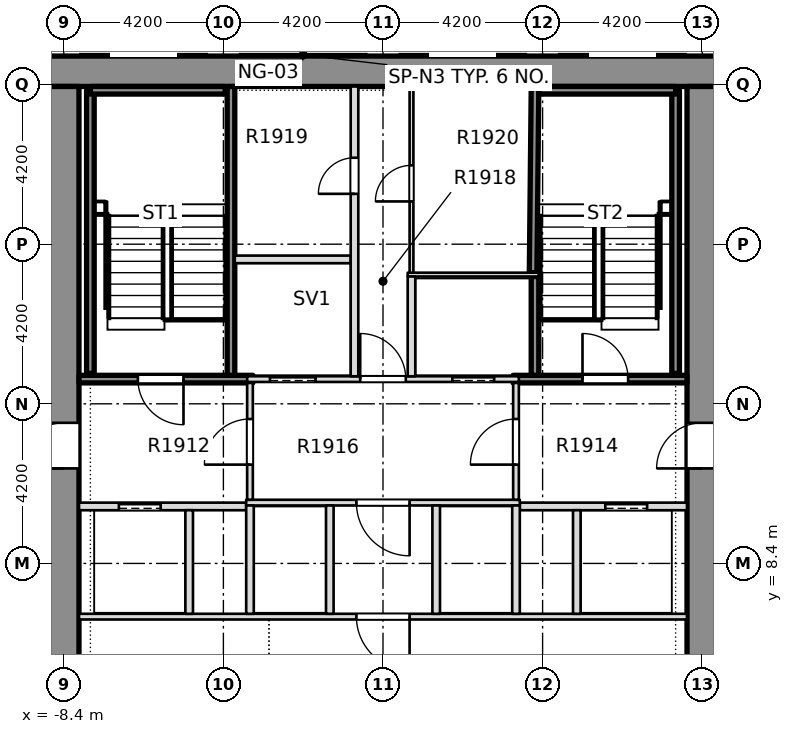
"""IFC4 building model, lengths in metres.
Left out: names, types, materials, properties, quantities, classifications, styles, units other than length and angle.
Written with IfcOpenShell. Run it as: python <this file> out.ifc"""

import sys

from ifc_helpers import new_model, si_unit, direction, frame, frame_2d, origin, place, context, subcontext, project, spatial, rectangle, extrude, element, fill, save


model = new_model("IFC4")
c1 = context("Model", 3, precision=1e-05, world=origin(), true_north=direction((0.0, 1.0)))
c2 = subcontext(c1, "Body", "Model", "MODEL_VIEW")
j1 = project(units=[si_unit("LENGTHUNIT", "METRE"), si_unit("PLANEANGLEUNIT", "RADIAN")], contexts=[c1])
p1 = place(None, origin())
s1 = spatial("IfcSite", under=j1, at=p1, CompositionType="ELEMENT")
p2 = place(p1, origin())
s2 = spatial("IfcBuilding", under=s1, at=p2, CompositionType="ELEMENT")
p3 = place(p2, frame((0.0, 0.0, 75.9)))
s3 = spatial("IfcBuildingStorey", under=s2, at=p3, CompositionType="ELEMENT", Elevation=75.9)
p4 = place(p3, frame((-11.7, 21.3, -0.5), z_axis=(0.0, 0.0, 1.0), x_axis=(1.0, 0.0, 0.0)))
e1 = element("IfcWall", 1, at=p4, inside=s3, PredefinedType="SOLIDWALL", context=c2, shape_type="SweptSolid", body=[
    extrude(rectangle(XDim=23.4, YDim=0.9, at=frame_2d((11.7, 0.0))), origin(), (0.0, 0.0, 1.0), 4.68),
])
p5 = place(p3, frame((-8.4, -7.5, -0.5), z_axis=(0.0, 0.0, 1.0), x_axis=(0.0, 1.0, 0.0)))
e2 = element("IfcWall", 2, at=p5, inside=s3, PredefinedType="SHEAR", context=c2, shape_type="SweptSolid", body=[
    extrude(rectangle(XDim=28.35, YDim=0.9, at=frame_2d((14.175, 0.0))), origin(), (0.0, 0.0, 1.0), 4.68),
])
p6 = place(p5, frame((18.4, 0.0, 0.5)))
e3 = element("IfcOpeningElement", 3, at=p6, cuts=e2, PredefinedType="OPENING", context=c2, shape_type="SweptSolid", body=[
    extrude(rectangle(XDim=1.2, YDim=2.1, at=frame_2d((0.6, 1.05))), frame((0.0, 0.46, 0.0), z_axis=(0.0, -1.0, 0.0), x_axis=(1.0, 0.0, 0.0)), (0.0, 0.0, 1.0), 0.92),
])
p7 = place(p3, frame((8.4, -7.5, -0.5), z_axis=(0.0, 0.0, 1.0), x_axis=(0.0, 1.0, 0.0)))
e4 = element("IfcWall", 4, at=p7, inside=s3, PredefinedType="SHEAR", context=c2, shape_type="SweptSolid", body=[
    extrude(rectangle(XDim=28.35, YDim=0.9, at=frame_2d((14.175, 0.0))), origin(), (0.0, 0.0, 1.0), 4.68),
])
p8 = place(p7, frame((18.4, 0.0, 0.5)))
e5 = element("IfcOpeningElement", 5, at=p8, cuts=e4, PredefinedType="OPENING", context=c2, shape_type="SweptSolid", body=[
    extrude(rectangle(XDim=1.2, YDim=2.1, at=frame_2d((0.6, 1.05))), frame((0.0, 0.46, 0.0), z_axis=(0.0, -1.0, 0.0), x_axis=(1.0, 0.0, 0.0)), (0.0, 0.0, 1.0), 0.92),
])
p9 = place(p3, frame((-7.949, 7.0, 0.0), z_axis=(0.0, 0.0, 1.0), x_axis=(1.0, 0.0, 0.0)))
e6 = element("IfcWall", 6, at=p9, inside=s3, PredefinedType="PARTITIONING", context=c2, shape_type="SweptSolid", body=[
    extrude(rectangle(XDim=15.898, YDim=0.15, at=frame_2d((7.949, 0.0))), origin(), (0.0, 0.0, 1.0), 4.18),
])
p10 = place(p9, frame((7.249, 0.0, 0.0)))
e7 = element("IfcOpeningElement", 7, at=p10, cuts=e6, PredefinedType="OPENING", context=c2, shape_type="SweptSolid", body=[
    extrude(rectangle(XDim=1.4, YDim=2.1, at=frame_2d((0.7, 1.05))), frame((0.0, 0.085, 0.0), z_axis=(0.0, -1.0, 0.0), x_axis=(1.0, 0.0, 0.0)), (0.0, 0.0, 1.0), 0.17),
])
p11 = place(p3, frame((-7.949, 9.9, 0.0), z_axis=(0.0, 0.0, 1.0), x_axis=(1.0, 0.0, 0.0)))
e8 = element("IfcWall", 8, at=p11, inside=s3, PredefinedType="PARTITIONING", context=c2, shape_type="SweptSolid", body=[
    extrude(rectangle(XDim=4.349, YDim=0.2, at=frame_2d((2.174, 0.0))), origin(), (0.0, 0.0, 1.0), 4.18),
])
p12 = place(p11, frame((0.999, 0.0, 0.0)))
e9 = element("IfcOpeningElement", 9, at=p12, cuts=e8, PredefinedType="OPENING", context=c2, shape_type="SweptSolid", body=[
    extrude(rectangle(XDim=1.1, YDim=2.1, at=frame_2d((0.55, 1.05))), frame((0.0, 0.11, 0.0), z_axis=(0.0, -1.0, 0.0), x_axis=(1.0, 0.0, 0.0)), (0.0, 0.0, 1.0), 0.22),
])
p13 = place(p3, frame((3.6, 9.9, 0.0), z_axis=(0.0, 0.0, 1.0), x_axis=(1.0, 0.0, 0.0)))
e10 = element("IfcWall", 10, at=p13, inside=s3, PredefinedType="PARTITIONING", context=c2, shape_type="SweptSolid", body=[
    extrude(rectangle(XDim=4.349, YDim=0.2, at=frame_2d((2.174, 0.0))), origin(), (0.0, 0.0, 1.0), 4.18),
])
p14 = place(p13, frame((2.25, 0.0, 0.0)))
e11 = element("IfcOpeningElement", 11, at=p14, cuts=e10, PredefinedType="OPENING", context=c2, shape_type="SweptSolid", body=[
    extrude(rectangle(XDim=1.1, YDim=2.1, at=frame_2d((0.55, 1.05))), frame((0.0, 0.11, 0.0), z_axis=(0.0, -1.0, 0.0), x_axis=(1.0, 0.0, 0.0)), (0.0, 0.0, 1.0), 0.22),
])
p15 = place(p3, frame((-3.6, 10.0, 0.0), z_axis=(0.0, 0.0, 1.0), x_axis=(1.0, 0.0, 0.0)))
e12 = element("IfcWall", 12, at=p15, inside=s3, PredefinedType="PARTITIONING", context=c2, shape_type="SweptSolid", body=[
    extrude(rectangle(XDim=7.2, YDim=0.15, at=frame_2d((3.6, 0.0))), origin(), (0.0, 0.0, 1.0), 4.18),
])
p16 = place(p15, frame((2.9, 0.0, 0.0)))
e13 = element("IfcOpeningElement", 13, at=p16, cuts=e12, PredefinedType="OPENING", context=c2, shape_type="SweptSolid", body=[
    extrude(rectangle(XDim=1.4, YDim=2.1, at=frame_2d((0.7, 1.05))), frame((0.0, 0.085, 0.0), z_axis=(0.0, -1.0, 0.0), x_axis=(1.0, 0.0, 0.0)), (0.0, 0.0, 1.0), 0.17),
])
p17 = place(p3, frame((-7.949, 13.25, 0.0), z_axis=(0.0, 0.0, 1.0), x_axis=(1.0, 0.0, 0.0)))
e14 = element("IfcWall", 14, at=p17, inside=s3, PredefinedType="SOLIDWALL", context=c2, shape_type="SweptSolid", body=[
    extrude(rectangle(XDim=4.524, YDim=0.2, at=frame_2d((2.262, 0.0))), origin(), (0.0, 0.0, 1.0), 4.18),
])
p18 = place(p17, frame((1.499, 0.0, 0.0)))
e15 = element("IfcOpeningElement", 15, at=p18, cuts=e14, PredefinedType="OPENING", context=c2, shape_type="SweptSolid", body=[
    extrude(rectangle(XDim=1.2, YDim=2.1, at=frame_2d((0.6, 1.05))), frame((0.0, 0.11, 0.0), z_axis=(0.0, -1.0, 0.0), x_axis=(1.0, 0.0, 0.0)), (0.0, 0.0, 1.0), 0.22),
])
p19 = place(p3, frame((-3.575, 13.25, 0.0), z_axis=(0.0, 0.0, 1.0), x_axis=(1.0, 0.0, 0.0)))
e16 = element("IfcWall", 16, at=p19, inside=s3, PredefinedType="PARTITIONING", context=c2, shape_type="SweptSolid", body=[
    extrude(rectangle(XDim=7.15, YDim=0.15, at=frame_2d((3.575, 0.0))), origin(), (0.0, 0.0, 1.0), 4.18),
])
p20 = place(p19, frame((0.6, 0.0, 0.0)))
e17 = element("IfcOpeningElement", 17, at=p20, cuts=e16, PredefinedType="OPENING", context=c2, shape_type="SweptSolid", body=[
    extrude(rectangle(XDim=1.2, YDim=2.1, at=frame_2d((0.6, 1.05))), frame((0.0, 0.085, 0.0), z_axis=(0.0, -1.0, 0.0), x_axis=(1.0, 0.0, 0.0)), (0.0, 0.0, 1.0), 0.17),
])
p21 = place(p19, frame((5.4, 0.0, 0.0)))
e18 = element("IfcOpeningElement", 18, at=p21, cuts=e16, PredefinedType="OPENING", context=c2, shape_type="SweptSolid", body=[
    extrude(rectangle(XDim=1.1, YDim=2.1, at=frame_2d((0.55, 1.05))), frame((0.0, 0.085, 0.0), z_axis=(0.0, -1.0, 0.0), x_axis=(1.0, 0.0, 0.0)), (0.0, 0.0, 1.0), 0.17),
])
p22 = place(p19, frame((2.975, 0.0, 0.0)))
e19 = element("IfcOpeningElement", 19, at=p22, cuts=e16, PredefinedType="OPENING", context=c2, shape_type="SweptSolid", body=[
    extrude(rectangle(XDim=1.2, YDim=2.1, at=frame_2d((0.6, 1.05))), frame((0.0, 0.085, 0.0), z_axis=(0.0, -1.0, 0.0), x_axis=(1.0, 0.0, 0.0)), (0.0, 0.0, 1.0), 0.17),
])
p23 = place(p3, frame((3.425, 13.25, 0.0), z_axis=(0.0, 0.0, 1.0), x_axis=(1.0, 0.0, 0.0)))
e20 = element("IfcWall", 20, at=p23, inside=s3, PredefinedType="SOLIDWALL", context=c2, shape_type="SweptSolid", body=[
    extrude(rectangle(XDim=4.524, YDim=0.2, at=frame_2d((2.262, 0.0))), origin(), (0.0, 0.0, 1.0), 4.18),
])
p24 = place(p23, frame((1.825, 0.0, 0.0)))
e21 = element("IfcOpeningElement", 21, at=p24, cuts=e20, PredefinedType="OPENING", context=c2, shape_type="SweptSolid", body=[
    extrude(rectangle(XDim=1.2, YDim=2.1, at=frame_2d((0.6, 1.05))), frame((0.0, 0.11, 0.0), z_axis=(0.0, -1.0, 0.0), x_axis=(1.0, 0.0, 0.0)), (0.0, 0.0, 1.0), 0.22),
])
p25 = place(p3, frame((0.65, 16.0, 0.0), z_axis=(0.0, 0.0, 1.0), x_axis=(1.0, 0.0, 0.0)))
e22 = element("IfcWall", 22, at=p25, inside=s3, PredefinedType="PARTITIONING", context=c2, shape_type="SweptSolid", body=[
    extrude(rectangle(XDim=3.45, YDim=0.1, at=frame_2d((1.725, 0.0))), origin(), (0.0, 0.0, 1.0), 4.18),
])
p26 = place(p3, frame((-3.9, 16.4, 0.0), z_axis=(0.0, 0.0, 1.0), x_axis=(1.0, 0.0, 0.0)))
e23 = element("IfcWall", 23, at=p26, inside=s3, PredefinedType="PARTITIONING", context=c2, shape_type="SweptSolid", body=[
    extrude(rectangle(XDim=3.05, YDim=0.2, at=frame_2d((1.525, 0.0))), origin(), (0.0, 0.0, 1.0), 4.18),
])
p27 = place(p3, frame((-5.1, 7.075, 0.0), z_axis=(0.0, 0.0, 1.0), x_axis=(0.0, 1.0, 0.0)))
e24 = element("IfcWall", 24, at=p27, inside=s3, PredefinedType="PARTITIONING", context=c2, shape_type="SweptSolid", body=[
    extrude(rectangle(XDim=2.725, YDim=0.2, at=frame_2d((1.363, 0.0))), origin(), (0.0, 0.0, 1.0), 4.18),
])
p28 = place(p3, frame((-4.0, 13.35, 0.0), z_axis=(0.0, 0.0, 1.0), x_axis=(0.0, 1.0, 0.0)))
e25 = element("IfcWall", 25, at=p28, inside=s3, PredefinedType="SOLIDWALL", context=c2, shape_type="SweptSolid", body=[
    extrude(rectangle(XDim=7.499, YDim=0.2, at=frame_2d((3.75, 0.0))), origin(), (0.0, 0.0, 1.0), 4.18),
])
p29 = place(p3, frame((-3.5, 7.075, 0.0), z_axis=(0.0, 0.0, 1.0), x_axis=(0.0, 1.0, 0.0)))
e26 = element("IfcWall", 26, at=p29, inside=s3, PredefinedType="PARTITIONING", context=c2, shape_type="SweptSolid", body=[
    extrude(rectangle(XDim=2.85, YDim=0.2, at=frame_2d((1.425, 0.0))), origin(), (0.0, 0.0, 1.0), 4.18),
])
p30 = place(p3, frame((-3.5, 10.075, 0.0), z_axis=(0.0, 0.0, 1.0), x_axis=(0.0, 1.0, 0.0)))
e27 = element("IfcWall", 27, at=p30, inside=s3, PredefinedType="PARTITIONING", context=c2, shape_type="SweptSolid", body=[
    extrude(rectangle(XDim=3.075, YDim=0.15, at=frame_2d((1.538, 0.0))), origin(), (0.0, 0.0, 1.0), 4.18),
])
p31 = place(p30, frame((0.925, 0.0, 0.0)))
e28 = element("IfcOpeningElement", 28, at=p31, cuts=e27, PredefinedType="OPENING", context=c2, shape_type="SweptSolid", body=[
    extrude(rectangle(XDim=1.2, YDim=2.1, at=frame_2d((0.6, 1.05))), frame((0.0, 0.085, 0.0), z_axis=(0.0, -1.0, 0.0), x_axis=(1.0, 0.0, 0.0)), (0.0, 0.0, 1.0), 0.17),
])
p32 = place(p3, frame((-1.4, 7.075, 0.0), z_axis=(0.0, 0.0, 1.0), x_axis=(0.0, 1.0, 0.0)))
e29 = element("IfcWall", 29, at=p32, inside=s3, PredefinedType="PARTITIONING", context=c2, shape_type="SweptSolid", body=[
    extrude(rectangle(XDim=2.85, YDim=0.2, at=frame_2d((1.425, 0.0))), origin(), (0.0, 0.0, 1.0), 4.18),
])
p33 = place(p3, frame((-0.75, 13.325, 0.0), z_axis=(0.0, 0.0, 1.0), x_axis=(0.0, 1.0, 0.0)))
e30 = element("IfcWall", 30, at=p33, inside=s3, PredefinedType="PARTITIONING", context=c2, shape_type="SweptSolid", body=[
    extrude(rectangle(XDim=7.524, YDim=0.2, at=frame_2d((3.762, 0.0))), origin(), (0.0, 0.0, 1.0), 4.18),
])
p34 = place(p33, frame((4.8, 0.0, 0.0)))
e31 = element("IfcOpeningElement", 31, at=p34, cuts=e30, PredefinedType="OPENING", context=c2, shape_type="SweptSolid", body=[
    extrude(rectangle(XDim=0.95, YDim=2.1, at=frame_2d((0.475, 1.05))), frame((0.0, 0.11, 0.0), z_axis=(0.0, -1.0, 0.0), x_axis=(1.0, 0.0, 0.0)), (0.0, 0.0, 1.0), 0.22),
])
p35 = place(p3, frame((0.75, 13.325, 0.0), z_axis=(0.0, 0.0, 1.0), x_axis=(0.0, 1.0, 0.0)))
e32 = element("IfcWall", 32, at=p35, inside=s3, PredefinedType="PARTITIONING", context=c2, shape_type="SweptSolid", body=[
    extrude(rectangle(XDim=2.625, YDim=0.2, at=frame_2d((1.312, 0.0))), origin(), (0.0, 0.0, 1.0), 4.18),
])
p36 = place(p3, frame((0.75, 16.05, 0.0), z_axis=(0.0, 0.0, 1.0), x_axis=(0.0, 1.0, 0.0)))
e33 = element("IfcWall", 33, at=p36, inside=s3, PredefinedType="PARTITIONING", context=c2, shape_type="SweptSolid", body=[
    extrude(rectangle(XDim=4.799, YDim=0.1, at=frame_2d((2.399, 0.0))), origin(), (0.0, 0.0, 1.0), 4.18),
])
p37 = place(p36, frame((1.875, 0.0, 0.0)))
e34 = element("IfcOpeningElement", 34, at=p37, cuts=e33, PredefinedType="OPENING", context=c2, shape_type="SweptSolid", body=[
    extrude(rectangle(XDim=0.95, YDim=2.1, at=frame_2d((0.475, 1.05))), frame((0.0, 0.06, 0.0), z_axis=(0.0, -1.0, 0.0), x_axis=(1.0, 0.0, 0.0)), (0.0, 0.0, 1.0), 0.12),
])
for number, where, z_axis, x_axis in (
    (35, (1.4, 7.075, 0.0), (0.0, 0.0, 1.0), (0.0, 1.0, 0.0)),
    (36, (3.5, 7.075, 0.0), (0.0, 0.0, 1.0), (0.0, 1.0, 0.0)),
):
    element("IfcWall", number, at=place(p3, frame(where, z_axis=z_axis, x_axis=x_axis)), inside=s3, PredefinedType="PARTITIONING", context=c2, shape_type="SweptSolid", body=[
        extrude(rectangle(XDim=2.85, YDim=0.2, at=frame_2d((1.425, 0.0))), origin(), (0.0, 0.0, 1.0), 4.18),
    ])
p38 = place(p3, frame((3.5, 10.075, 0.0), z_axis=(0.0, 0.0, 1.0), x_axis=(0.0, 1.0, 0.0)))
e37 = element("IfcWall", 37, at=p38, inside=s3, PredefinedType="PARTITIONING", context=c2, shape_type="SweptSolid", body=[
    extrude(rectangle(XDim=3.075, YDim=0.15, at=frame_2d((1.538, 0.0))), origin(), (0.0, 0.0, 1.0), 4.18),
])
p39 = place(p38, frame((0.925, 0.0, 0.0)))
e38 = element("IfcOpeningElement", 38, at=p39, cuts=e37, PredefinedType="OPENING", context=c2, shape_type="SweptSolid", body=[
    extrude(rectangle(XDim=1.2, YDim=2.1, at=frame_2d((0.6, 1.05))), frame((0.0, 0.085, 0.0), z_axis=(0.0, -1.0, 0.0), x_axis=(1.0, 0.0, 0.0)), (0.0, 0.0, 1.0), 0.17),
])
p40 = place(p3, frame((4.0, 13.35, 0.0), z_axis=(0.0, 0.0, 1.0), x_axis=(0.0, 1.0, 0.0)))
e39 = element("IfcWall", 39, at=p40, inside=s3, PredefinedType="SOLIDWALL", context=c2, shape_type="SweptSolid", body=[
    extrude(rectangle(XDim=2.6, YDim=0.2, at=frame_2d((1.3, 0.0))), origin(), (0.0, 0.0, 1.0), 4.18),
])
p41 = place(p3, frame((3.95, 16.05, 0.0), z_axis=(0.0, 0.0, 1.0), x_axis=(0.010538176883, 0.999944471872, 0.0)))
e40 = element("IfcWall", 40, at=p41, inside=s3, PredefinedType="SOLIDWALL", context=c2, shape_type="SweptSolid", body=[
    extrude(rectangle(XDim=4.749, YDim=0.2, at=frame_2d((2.375, 0.0))), origin(), (0.0, 0.0, 1.0), 4.18),
])
p42 = place(p3, frame((5.1, 7.075, 0.0), z_axis=(0.0, 0.0, 1.0), x_axis=(0.0, 1.0, 0.0)))
e41 = element("IfcWall", 41, at=p42, inside=s3, PredefinedType="PARTITIONING", context=c2, shape_type="SweptSolid", body=[
    extrude(rectangle(XDim=2.725, YDim=0.2, at=frame_2d((1.363, 0.0))), origin(), (0.0, 0.0, 1.0), 4.18),
])
for number, where, z_axis, x_axis in (
    (42, (-7.7, 13.4, 0.0), (0.0, 0.0, 1.0), (0.0, 1.0, 0.0)),
    (43, (7.7, 13.4, 0.0), (0.0, 0.0, 1.0), (0.0, 1.0, 0.0)),
):
    element("IfcWall", number, at=place(p3, frame(where, z_axis=z_axis, x_axis=x_axis)), inside=s3, PredefinedType="SOLIDWALL", context=c2, shape_type="SweptSolid", body=[
        extrude(rectangle(XDim=7.4, YDim=0.2, at=frame_2d((3.7, 0.0))), origin(), (0.0, 0.0, 1.0), 4.18),
    ])
p43 = place(p18, origin())
e44 = element("IfcDoor", 44, at=p43, inside=s3, OperationType="SINGLE_SWING_LEFT", PredefinedType="DOOR", context=c2, shape_type="SweptSolid", body=[
    extrude(rectangle(XDim=1.2, YDim=2.1, at=frame_2d((0.6, 1.05))), frame((0.0, 0.025, 0.0), z_axis=(0.0, -1.0, 0.0), x_axis=(1.0, 0.0, 0.0)), (0.0, 0.0, 1.0), 0.05),
])
fill(e15, e44)
p44 = place(p12, origin())
e45 = element("IfcDoor", 45, at=p44, inside=s3, OperationType="SLIDING_TO_RIGHT", PredefinedType="DOOR", context=c2, shape_type="SweptSolid", body=[
    extrude(rectangle(XDim=1.1, YDim=2.1, at=frame_2d((0.55, 1.05))), frame((0.0, 0.025, 0.0), z_axis=(0.0, -1.0, 0.0), x_axis=(1.0, 0.0, 0.0)), (0.0, 0.0, 1.0), 0.05),
])
fill(e9, e45)
p45 = place(p24, origin())
e46 = element("IfcDoor", 46, at=p45, inside=s3, OperationType="SINGLE_SWING_RIGHT", PredefinedType="DOOR", context=c2, shape_type="SweptSolid", body=[
    extrude(rectangle(XDim=1.2, YDim=2.1, at=frame_2d((0.6, 1.05))), frame((0.0, 0.025, 0.0), z_axis=(0.0, -1.0, 0.0), x_axis=(1.0, 0.0, 0.0)), (0.0, 0.0, 1.0), 0.05),
])
fill(e21, e46)
p46 = place(p14, origin())
e47 = element("IfcDoor", 47, at=p46, inside=s3, OperationType="SLIDING_TO_LEFT", PredefinedType="DOOR", context=c2, shape_type="SweptSolid", body=[
    extrude(rectangle(XDim=1.1, YDim=2.1, at=frame_2d((0.55, 1.05))), frame((0.0, 0.025, 0.0), z_axis=(0.0, -1.0, 0.0), x_axis=(1.0, 0.0, 0.0)), (0.0, 0.0, 1.0), 0.05),
])
fill(e11, e47)
p47 = place(p10, origin())
e48 = element("IfcDoor", 48, at=p47, inside=s3, OperationType="SINGLE_SWING_RIGHT", PredefinedType="DOOR", context=c2, shape_type="SweptSolid", body=[
    extrude(rectangle(XDim=1.4, YDim=2.1, at=frame_2d((0.7, 1.05))), frame((0.0, 0.025, 0.0), z_axis=(0.0, -1.0, 0.0), x_axis=(1.0, 0.0, 0.0)), (0.0, 0.0, 1.0), 0.05),
])
fill(e7, e48)
p48 = place(p16, origin())
e49 = element("IfcDoor", 49, at=p48, inside=s3, OperationType="SINGLE_SWING_RIGHT", PredefinedType="DOOR", context=c2, shape_type="SweptSolid", body=[
    extrude(rectangle(XDim=1.4, YDim=2.1, at=frame_2d((0.7, 1.05))), frame((0.0, 0.025, 0.0), z_axis=(0.0, -1.0, 0.0), x_axis=(1.0, 0.0, 0.0)), (0.0, 0.0, 1.0), 0.05),
])
fill(e13, e49)
p49 = place(p20, origin())
e50 = element("IfcDoor", 50, at=p49, inside=s3, OperationType="SLIDING_TO_RIGHT", PredefinedType="DOOR", context=c2, shape_type="SweptSolid", body=[
    extrude(rectangle(XDim=1.2, YDim=2.1, at=frame_2d((0.6, 1.05))), frame((0.0, 0.025, 0.0), z_axis=(0.0, -1.0, 0.0), x_axis=(1.0, 0.0, 0.0)), (0.0, 0.0, 1.0), 0.05),
])
fill(e17, e50)
p50 = place(p21, origin())
e51 = element("IfcDoor", 51, at=p50, inside=s3, OperationType="SLIDING_TO_LEFT", PredefinedType="DOOR", context=c2, shape_type="SweptSolid", body=[
    extrude(rectangle(XDim=1.1, YDim=2.1, at=frame_2d((0.55, 1.05))), frame((0.0, 0.025, 0.0), z_axis=(0.0, -1.0, 0.0), x_axis=(1.0, 0.0, 0.0)), (0.0, 0.0, 1.0), 0.05),
])
fill(e18, e51)
p51 = place(p22, origin())
e52 = element("IfcDoor", 52, at=p51, inside=s3, OperationType="SINGLE_SWING_RIGHT", PredefinedType="DOOR", context=c2, shape_type="SweptSolid", body=[
    extrude(rectangle(XDim=1.2, YDim=2.1, at=frame_2d((0.6, 1.05))), frame((0.0, 0.025, 0.0), z_axis=(0.0, -1.0, 0.0), x_axis=(1.0, 0.0, 0.0)), (0.0, 0.0, 1.0), 0.05),
])
fill(e19, e52)
p52 = place(p34, origin())
e53 = element("IfcDoor", 53, at=p52, inside=s3, OperationType="SINGLE_SWING_RIGHT", PredefinedType="DOOR", context=c2, shape_type="SweptSolid", body=[
    extrude(rectangle(XDim=0.95, YDim=2.1, at=frame_2d((0.475, 1.05))), frame((0.0, 0.025, 0.0), z_axis=(0.0, -1.0, 0.0), x_axis=(1.0, 0.0, 0.0)), (0.0, 0.0, 1.0), 0.05),
])
fill(e31, e53)
p53 = place(p37, origin())
e54 = element("IfcDoor", 54, at=p53, inside=s3, OperationType="SINGLE_SWING_LEFT", PredefinedType="DOOR", context=c2, shape_type="SweptSolid", body=[
    extrude(rectangle(XDim=0.95, YDim=2.1, at=frame_2d((0.475, 1.05))), frame((0.0, 0.025, 0.0), z_axis=(0.0, -1.0, 0.0), x_axis=(1.0, 0.0, 0.0)), (0.0, 0.0, 1.0), 0.05),
])
fill(e34, e54)
p54 = place(p31, origin())
e55 = element("IfcDoor", 55, at=p54, inside=s3, OperationType="SINGLE_SWING_RIGHT", PredefinedType="DOOR", context=c2, shape_type="SweptSolid", body=[
    extrude(rectangle(XDim=1.2, YDim=2.1, at=frame_2d((0.6, 1.05))), frame((0.0, 0.025, 0.0), z_axis=(0.0, -1.0, 0.0), x_axis=(1.0, 0.0, 0.0)), (0.0, 0.0, 1.0), 0.05),
])
fill(e28, e55)
p55 = place(p39, origin())
e56 = element("IfcDoor", 56, at=p55, inside=s3, OperationType="SINGLE_SWING_LEFT", PredefinedType="DOOR", context=c2, shape_type="SweptSolid", body=[
    extrude(rectangle(XDim=1.2, YDim=2.1, at=frame_2d((0.6, 1.05))), frame((0.0, 0.025, 0.0), z_axis=(0.0, -1.0, 0.0), x_axis=(1.0, 0.0, 0.0)), (0.0, 0.0, 1.0), 0.05),
])
fill(e38, e56)
p56 = place(p6, origin())
e57 = element("IfcDoor", 57, at=p56, inside=s3, OperationType="SINGLE_SWING_LEFT", PredefinedType="DOOR", context=c2, shape_type="SweptSolid", body=[
    extrude(rectangle(XDim=1.2, YDim=2.1, at=frame_2d((0.6, 1.05))), frame((0.0, 0.025, 0.0), z_axis=(0.0, -1.0, 0.0), x_axis=(1.0, 0.0, 0.0)), (0.0, 0.0, 1.0), 0.05),
])
fill(e3, e57)
p57 = place(p8, origin())
e58 = element("IfcDoor", 58, at=p57, inside=s3, OperationType="SINGLE_SWING_LEFT", PredefinedType="DOOR", context=c2, shape_type="SweptSolid", body=[
    extrude(rectangle(XDim=1.2, YDim=2.1, at=frame_2d((0.6, 1.05))), frame((0.0, 0.025, 0.0), z_axis=(0.0, -1.0, 0.0), x_axis=(1.0, 0.0, 0.0)), (0.0, 0.0, 1.0), 0.05),
])
fill(e5, e58)
save(model, sys.argv[1])
